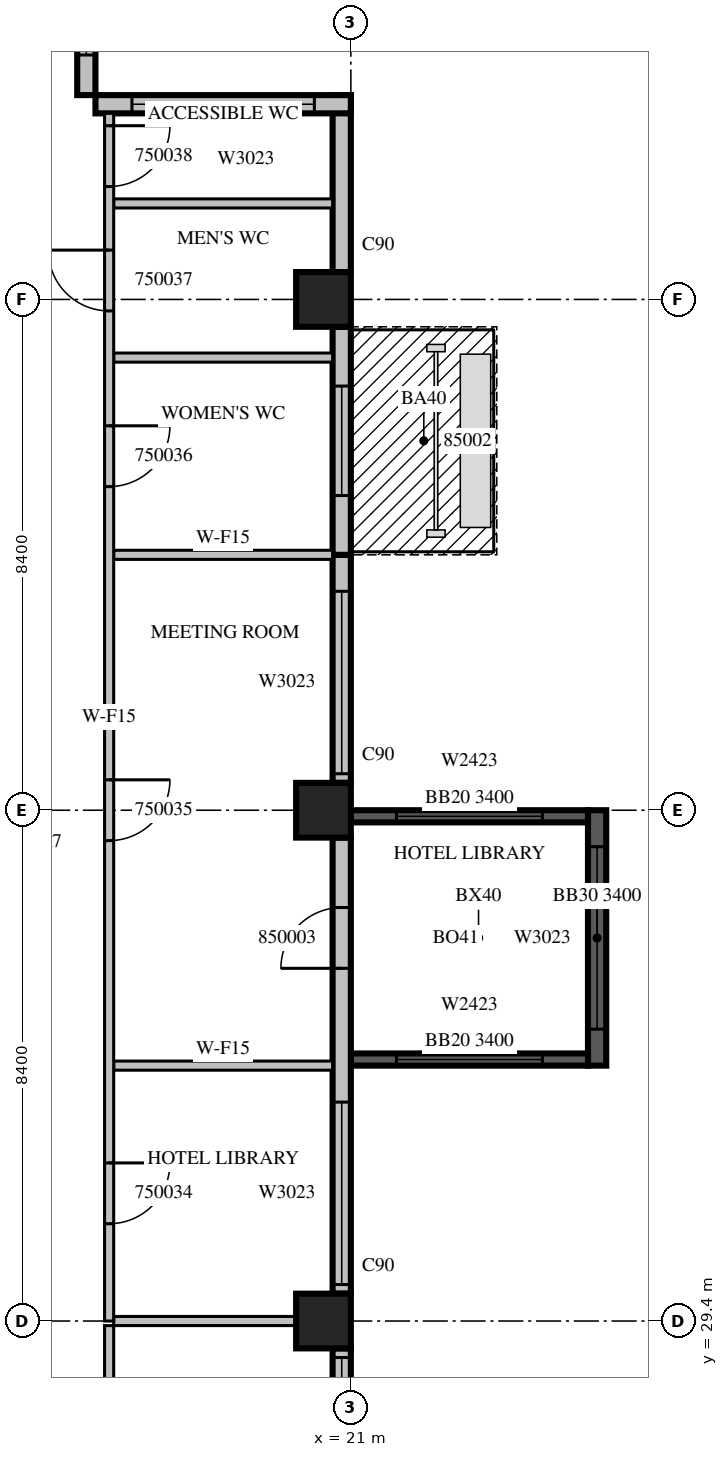
"""IFC4 building model, lengths in metres.
Left out: names, types, materials, properties, quantities, classifications, styles, units other than length and angle.
Written with IfcOpenShell. Run it as: python <this file> out.ifc"""

import sys

from ifc_helpers import new_model, si_unit, direction, frame, frame_2d, origin, origin_2d, place, context, subcontext, project, spatial, rectangle, extrude, source, transform, mapped, element, fill, save


model = new_model("IFC4")
c1 = context("Model", 3, precision=1e-05, world=origin(), true_north=direction((0.0, 1.0)))
c2 = subcontext(c1, "Body", "Model", "MODEL_VIEW")
j1 = project(units=[si_unit("LENGTHUNIT", "METRE"), si_unit("PLANEANGLEUNIT", "RADIAN")], contexts=[c1])
p1 = place(None, origin())
s1 = spatial("IfcSite", under=j1, at=p1, CompositionType="ELEMENT")
p2 = place(p1, origin())
s2 = spatial("IfcBuilding", under=s1, at=p2, CompositionType="ELEMENT")
p3 = place(p2, frame((0.0, 0.0, 223.4)))
s3 = spatial("IfcBuildingStorey", under=s2, at=p3, CompositionType="ELEMENT", Elevation=223.4)
m1 = source(origin(), c2, "Body", "SweptSolid", [
    extrude(rectangle(XDim=0.9, YDim=0.9, at=origin_2d()), origin(), (0.0, 0.0, 1.0), 3.8),
])
for number, where, z_axis, x_axis in (
    (1, (20.55, 29.4, 0.0), (0.0, 0.0, 1.0), (1.0, 0.0, 0.0)),
    (2, (20.55, 37.8, 0.0), (0.0, 0.0, 1.0), (1.0, 0.0, 0.0)),
    (3, (20.55, 46.2, 0.0), (0.0, 0.0, 1.0), (1.0, 0.0, 0.0)),
):
    element("IfcColumn", number, at=place(p3, frame(where, z_axis=z_axis, x_axis=x_axis)), inside=s3, PredefinedType="COLUMN", context=c2, shape_type="MappedRepresentation", body=[
        mapped(m1, transform((0.0, 0.0, 0.0), scale=1.0)),
    ])
m2 = source(origin(), c2, "Body", "SweptSolid", [
    extrude(rectangle(XDim=4.2, YDim=0.3, at=frame_2d((2.1, 0.0))), origin(), (0.0, 0.0, 1.0), 3.4),
])
p4 = place(p3, frame((25.05, 33.6, 0.0), z_axis=(0.0, 0.0, 1.0), x_axis=(0.0, 1.0, 0.0)))
e4 = element("IfcWall", 4, at=p4, inside=s3, PredefinedType="SOLIDWALL", context=c2, shape_type="MappedRepresentation", body=[
    mapped(m2, transform((0.0, 0.0, 0.0), scale=1.0)),
])
m3 = source(origin(), c2, "Body", "SweptSolid", [
    extrude(rectangle(XDim=3.0, YDim=2.3, at=frame_2d((1.5, 1.15))), frame((0.0, 0.16, 0.0), z_axis=(0.0, -1.0, 0.0), x_axis=(1.0, 0.0, 0.0)), (0.0, 0.0, 1.0), 0.32),
])
p5 = place(p4, frame((0.6, 0.0, 0.6)))
e5 = element("IfcOpeningElement", 5, at=p5, cuts=e4, PredefinedType="OPENING", context=c2, shape_type="MappedRepresentation", body=[
    mapped(m3, transform((0.0, 0.0, 0.0), scale=1.0)),
])
m4 = source(origin(), c2, "Body", "SweptSolid", [
    extrude(rectangle(XDim=3.9, YDim=0.2, at=frame_2d((1.95, 0.0))), origin(), (0.0, 0.0, 1.0), 3.4),
])
p6 = place(p3, frame((21.0, 33.7, 0.0), z_axis=(0.0, 0.0, 1.0), x_axis=(1.0, 0.0, 0.0)))
e6 = element("IfcWall", 6, at=p6, inside=s3, PredefinedType="SOLIDWALL", context=c2, shape_type="MappedRepresentation", body=[
    mapped(m4, transform((0.0, 0.0, 0.0), scale=1.0)),
])
m5 = source(origin(), c2, "Body", "SweptSolid", [
    extrude(rectangle(XDim=2.4, YDim=2.3, at=frame_2d((1.2, 1.15))), frame((0.0, 0.11, 0.0), z_axis=(0.0, -1.0, 0.0), x_axis=(1.0, 0.0, 0.0)), (0.0, 0.0, 1.0), 0.22),
])
p7 = place(p6, frame((0.75, 0.0, 0.6)))
e7 = element("IfcOpeningElement", 7, at=p7, cuts=e6, PredefinedType="OPENING", context=c2, shape_type="MappedRepresentation", body=[
    mapped(m5, transform((0.0, 0.0, 0.0), scale=1.0)),
])
p8 = place(p3, frame((21.0, 37.7, 0.0), z_axis=(0.0, 0.0, 1.0), x_axis=(1.0, 0.0, 0.0)))
e8 = element("IfcWall", 8, at=p8, inside=s3, PredefinedType="SOLIDWALL", context=c2, shape_type="MappedRepresentation", body=[
    mapped(m4, transform((0.0, 0.0, 0.0), scale=1.0)),
])
p9 = place(p8, frame((0.75, 0.0, 0.6)))
e9 = element("IfcOpeningElement", 9, at=p9, cuts=e8, PredefinedType="OPENING", context=c2, shape_type="MappedRepresentation", body=[
    mapped(m5, transform((0.0, 0.0, 0.0), scale=1.0)),
])
m6 = source(origin(), c2, "Body", "SweptSolid", [
    extrude(rectangle(XDim=7.15, YDim=0.3, at=frame_2d((3.575, 0.0))), origin(), (0.0, 0.0, 1.0), 3.4),
])
p10 = place(p3, frame((20.85, 21.8, 0.0), z_axis=(0.0, 0.0, 1.0), x_axis=(0.0, 1.0, 0.0)))
e10 = element("IfcWall", 10, at=p10, inside=s3, PredefinedType="STANDARD", context=c2, shape_type="MappedRepresentation", body=[
    mapped(m6, transform((0.0, 0.0, 0.0), scale=1.0)),
])
m7 = source(origin(), c2, "Body", "SweptSolid", [
    extrude(rectangle(XDim=1.8, YDim=2.3, at=frame_2d((0.9, 1.15))), frame((0.0, 0.16, 0.0), z_axis=(0.0, -1.0, 0.0), x_axis=(1.0, 0.0, 0.0)), (0.0, 0.0, 1.0), 0.32),
])
p11 = place(p10, frame((0.4, 0.0, 0.6)))
e11 = element("IfcOpeningElement", 11, at=p11, cuts=e10, PredefinedType="OPENING", context=c2, shape_type="MappedRepresentation", body=[
    mapped(m7, transform((0.0, 0.0, 0.0), scale=1.0)),
])
p12 = place(p10, frame((4.0, 0.0, 0.6)))
e12 = element("IfcOpeningElement", 12, at=p12, cuts=e10, PredefinedType="OPENING", context=c2, shape_type="MappedRepresentation", body=[
    mapped(m3, transform((0.0, 0.0, 0.0), scale=1.0)),
])
m8 = source(origin(), c2, "Body", "SweptSolid", [
    extrude(rectangle(XDim=7.5, YDim=0.3, at=frame_2d((3.75, 0.0))), origin(), (0.0, 0.0, 1.0), 3.4),
])
p13 = place(p3, frame((20.85, 29.85, 0.0), z_axis=(0.0, 0.0, 1.0), x_axis=(0.0, 1.0, 0.0)))
e13 = element("IfcWall", 13, at=p13, inside=s3, PredefinedType="STANDARD", context=c2, shape_type="MappedRepresentation", body=[
    mapped(m8, transform((0.0, 0.0, 0.0), scale=1.0)),
])
p14 = place(p13, frame((0.15, 0.0, 0.6)))
e14 = element("IfcOpeningElement", 14, at=p14, cuts=e13, PredefinedType="OPENING", context=c2, shape_type="MappedRepresentation", body=[
    mapped(m3, transform((0.0, 0.0, 0.0), scale=1.0)),
])
m9 = source(origin(), c2, "Body", "SweptSolid", [
    extrude(rectangle(XDim=1.0, YDim=2.1, at=frame_2d((0.5, 1.05))), frame((0.0, 0.16, 0.0), z_axis=(0.0, -1.0, 0.0), x_axis=(1.0, 0.0, 0.0)), (0.0, 0.0, 1.0), 0.32),
])
p15 = place(p13, frame((5.35, 0.0, 0.0)))
e15 = element("IfcOpeningElement", 15, at=p15, cuts=e13, PredefinedType="OPENING", context=c2, shape_type="MappedRepresentation", body=[
    mapped(m9, transform((0.0, 0.0, 0.0), scale=1.0)),
])
m10 = source(origin(), c2, "Body", "SweptSolid", [
    extrude(rectangle(XDim=3.75, YDim=0.3, at=frame_2d((1.875, 0.0))), origin(), (0.0, 0.0, 1.0), 3.4),
])
p16 = place(p3, frame((20.85, 38.25, 0.0), z_axis=(0.0, 0.0, 1.0), x_axis=(0.0, 1.0, 0.0)))
e16 = element("IfcWall", 16, at=p16, inside=s3, PredefinedType="STANDARD", context=c2, shape_type="MappedRepresentation", body=[
    mapped(m10, transform((0.0, 0.0, 0.0), scale=1.0)),
])
p17 = place(p16, frame((0.15, 0.0, 0.6)))
e17 = element("IfcOpeningElement", 17, at=p17, cuts=e16, PredefinedType="OPENING", context=c2, shape_type="MappedRepresentation", body=[
    mapped(m3, transform((0.0, 0.0, 0.0), scale=1.0)),
])
p18 = place(p3, frame((20.85, 42.0, 0.0), z_axis=(0.0, 0.0, 1.0), x_axis=(0.0, 1.0, 0.0)))
e18 = element("IfcWall", 18, at=p18, inside=s3, PredefinedType="STANDARD", context=c2, shape_type="MappedRepresentation", body=[
    mapped(m10, transform((0.0, 0.0, 0.0), scale=1.0)),
])
m11 = source(origin(), c2, "Body", "SweptSolid", [
    extrude(rectangle(XDim=1.8, YDim=2.4, at=frame_2d((0.9, 1.2))), frame((0.0, 0.16, 0.0), z_axis=(0.0, -1.0, 0.0), x_axis=(1.0, 0.0, 0.0)), (0.0, 0.0, 1.0), 0.32),
])
p19 = place(p18, frame((0.975, 0.0, 0.0)))
e19 = element("IfcOpeningElement", 19, at=p19, cuts=e18, PredefinedType="OPENING", context=c2, shape_type="MappedRepresentation", body=[
    mapped(m11, transform((0.0, 0.0, 0.0), scale=1.0)),
])
m12 = source(origin(), c2, "Body", "SweptSolid", [
    extrude(rectangle(XDim=2.91, YDim=0.3, at=frame_2d((1.455, 0.0))), origin(), (0.0, 0.0, 1.0), 3.4),
])
p20 = place(p3, frame((20.85, 46.65, 0.0), z_axis=(0.0, 0.0, 1.0), x_axis=(0.0, 1.0, 0.0)))
e20 = element("IfcWall", 20, at=p20, inside=s3, PredefinedType="STANDARD", context=c2, shape_type="MappedRepresentation", body=[
    mapped(m12, transform((0.0, 0.0, 0.0), scale=1.0)),
])
m13 = source(origin(), c2, "Body", "SweptSolid", [
    extrude(rectangle(XDim=4.2, YDim=0.3, at=frame_2d((2.1, 0.0))), origin(), (0.0, 0.0, 1.0), 3.4),
])
p21 = place(p3, frame((21.0, 49.41, 0.0), z_axis=(0.0, 0.0, 1.0), x_axis=(-1.0, 0.0, 0.0)))
e21 = element("IfcWall", 21, at=p21, inside=s3, PredefinedType="STANDARD", context=c2, shape_type="MappedRepresentation", body=[
    mapped(m13, transform((0.0, 0.0, 0.0), scale=1.0)),
])
p22 = place(p21, frame((0.6, 0.0, 0.6)))
e22 = element("IfcOpeningElement", 22, at=p22, cuts=e21, PredefinedType="OPENING", context=c2, shape_type="MappedRepresentation", body=[
    mapped(m3, transform((0.0, 0.0, 0.0), scale=1.0)),
])
m14 = source(origin(), c2, "Body", "SweptSolid", [
    extrude(rectangle(XDim=2.52, YDim=0.3, at=frame_2d((1.26, 0.0))), origin(), (0.0, 0.0, 1.0), 3.4),
])
p23 = place(p3, frame((16.65, 49.56, 0.0), z_axis=(0.0, 0.0, 1.0), x_axis=(0.0, 1.0, 0.0)))
e23 = element("IfcWall", 23, at=p23, inside=s3, PredefinedType="STANDARD", context=c2, shape_type="MappedRepresentation", body=[
    mapped(m14, transform((0.0, 0.0, 0.0), scale=1.0)),
])
m15 = source(origin(), c2, "Body", "SweptSolid", [
    extrude(rectangle(XDim=1.2, YDim=2.3, at=frame_2d((0.6, 1.15))), frame((0.0, 0.16, 0.0), z_axis=(0.0, -1.0, 0.0), x_axis=(1.0, 0.0, 0.0)), (0.0, 0.0, 1.0), 0.32),
])
p24 = place(p23, frame((0.66, 0.0, 0.6)))
e24 = element("IfcOpeningElement", 24, at=p24, cuts=e23, PredefinedType="OPENING", context=c2, shape_type="MappedRepresentation", body=[
    mapped(m15, transform((0.0, 0.0, 0.0), scale=1.0)),
])
m16 = source(origin(), c2, "Body", "SweptSolid", [
    extrude(rectangle(XDim=4.05, YDim=0.15, at=frame_2d((2.025, 0.0))), origin(), (0.0, 0.0, 1.0), 3.4),
])
p25 = place(p3, frame((17.025, 29.325, 0.0), z_axis=(0.0, 0.0, 1.0), x_axis=(0.0, -1.0, 0.0)))
e25 = element("IfcWall", 25, at=p25, inside=s3, PredefinedType="PARTITIONING", context=c2, shape_type="MappedRepresentation", body=[
    mapped(m16, transform((0.0, 0.0, 0.0), scale=1.0)),
])
m17 = source(origin(), c2, "Body", "SweptSolid", [
    extrude(rectangle(XDim=3.001, YDim=0.15, at=frame_2d((1.5, 0.0))), origin(), (0.0, 0.0, 1.0), 3.4),
])
p26 = place(p3, frame((20.101, 29.4, 0.0), z_axis=(0.0, 0.0, 1.0), x_axis=(-1.0, 0.0, 0.0)))
e26 = element("IfcWall", 26, at=p26, inside=s3, PredefinedType="PARTITIONING", context=c2, shape_type="MappedRepresentation", body=[
    mapped(m17, transform((0.0, 0.0, 0.0), scale=1.0)),
])
m18 = source(origin(), c2, "Body", "SweptSolid", [
    extrude(rectangle(XDim=3.6, YDim=0.15, at=frame_2d((1.8, 0.0))), origin(), (0.0, 0.0, 1.0), 3.4),
])
for number, where, z_axis, x_axis in (
    (27, (17.1, 45.244, 0.0), (0.0, 0.0, 1.0), (1.0, 0.0, 0.0)),
    (28, (17.1, 47.779, 0.0), (0.0, 0.0, 1.0), (1.0, 0.0, 0.0)),
    (29, (20.7, 33.6, 0.0), (0.0, 0.0, 1.0), (-1.0, 0.0, 0.0)),
    (30, (20.7, 42.0, 0.0), (0.0, 0.0, 1.0), (-1.0, 0.0, 0.0)),
):
    element("IfcWall", number, at=place(p3, frame(where, z_axis=z_axis, x_axis=x_axis)), inside=s3, PredefinedType="PARTITIONING", context=c2, shape_type="MappedRepresentation", body=[
        mapped(m18, transform((0.0, 0.0, 0.0), scale=1.0)),
    ])
m19 = source(origin(), c2, "Body", "SweptSolid", [
    extrude(rectangle(XDim=19.86, YDim=0.15, at=frame_2d((9.93, 0.0))), origin(), (0.0, 0.0, 1.0), 3.4),
])
p27 = place(p3, frame((17.025, 49.26, 0.0), z_axis=(0.0, 0.0, 1.0), x_axis=(0.0, -1.0, 0.0)))
e31 = element("IfcWall", 31, at=p27, inside=s3, PredefinedType="PARTITIONING", context=c2, shape_type="MappedRepresentation", body=[
    mapped(m19, transform((0.0, 0.0, 0.0), scale=1.0)),
])
m20 = source(origin(), c2, "Body", "SweptSolid", [
    extrude(rectangle(XDim=1.0, YDim=2.1, at=frame_2d((0.5, 1.05))), frame((0.0, 0.085, 0.0), z_axis=(0.0, -1.0, 0.0), x_axis=(1.0, 0.0, 0.0)), (0.0, 0.0, 1.0), 0.17),
])
p28 = place(p27, frame((17.26, 0.0, 0.0)))
e32 = element("IfcOpeningElement", 32, at=p28, cuts=e31, PredefinedType="OPENING", context=c2, shape_type="MappedRepresentation", body=[
    mapped(m20, transform((0.0, 0.0, 0.0), scale=1.0)),
])
p29 = place(p27, frame((10.96, 0.0, 0.0)))
e33 = element("IfcOpeningElement", 33, at=p29, cuts=e31, PredefinedType="OPENING", context=c2, shape_type="MappedRepresentation", body=[
    mapped(m20, transform((0.0, 0.0, 0.0), scale=1.0)),
])
p30 = place(p27, frame((5.138, 0.0, 0.0)))
e34 = element("IfcOpeningElement", 34, at=p30, cuts=e31, PredefinedType="OPENING", context=c2, shape_type="MappedRepresentation", body=[
    mapped(m20, transform((0.0, 0.0, 0.0), scale=1.0)),
])
p31 = place(p27, frame((2.249, 0.0, 0.0)))
e35 = element("IfcOpeningElement", 35, at=p31, cuts=e31, PredefinedType="OPENING", context=c2, shape_type="MappedRepresentation", body=[
    mapped(m20, transform((0.0, 0.0, 0.0), scale=1.0)),
])
p32 = place(p27, frame((0.203, 0.0, 0.0)))
e36 = element("IfcOpeningElement", 36, at=p32, cuts=e31, PredefinedType="OPENING", context=c2, shape_type="MappedRepresentation", body=[
    mapped(m20, transform((0.0, 0.0, 0.0), scale=1.0)),
])
m21 = source(origin(), c2, "Body", "SweptSolid", [
    extrude(rectangle(XDim=3.0, YDim=2.3, at=frame_2d((1.5, 1.15))), frame((0.0, 0.03, 0.0), z_axis=(0.0, -1.0, 0.0), x_axis=(1.0, 0.0, 0.0)), (0.0, 0.0, 1.0), 0.06),
])
p33 = place(p5, origin())
e37 = element("IfcWindow", 37, at=p33, inside=s3, PartitioningType="SINGLE_PANEL", PredefinedType="WINDOW", context=c2, shape_type="MappedRepresentation", body=[
    mapped(m21, transform((0.0, 0.0, 0.0), scale=1.0)),
])
fill(e5, e37)
m22 = source(origin(), c2, "Body", "SweptSolid", [
    extrude(rectangle(XDim=2.4, YDim=2.3, at=frame_2d((1.2, 1.15))), frame((0.0, 0.03, 0.0), z_axis=(0.0, -1.0, 0.0), x_axis=(1.0, 0.0, 0.0)), (0.0, 0.0, 1.0), 0.06),
])
p34 = place(p7, origin())
e38 = element("IfcWindow", 38, at=p34, inside=s3, PartitioningType="SINGLE_PANEL", PredefinedType="WINDOW", context=c2, shape_type="MappedRepresentation", body=[
    mapped(m22, transform((0.0, 0.0, 0.0), scale=1.0)),
])
fill(e7, e38)
p35 = place(p9, origin())
e39 = element("IfcWindow", 39, at=p35, inside=s3, PartitioningType="SINGLE_PANEL", PredefinedType="WINDOW", context=c2, shape_type="MappedRepresentation", body=[
    mapped(m22, transform((0.0, 0.0, 0.0), scale=1.0)),
])
fill(e9, e39)
p36 = place(p12, origin())
e40 = element("IfcWindow", 40, at=p36, inside=s3, PartitioningType="SINGLE_PANEL", PredefinedType="WINDOW", context=c2, shape_type="MappedRepresentation", body=[
    mapped(m21, transform((0.0, 0.0, 0.0), scale=1.0)),
])
fill(e12, e40)
p37 = place(p14, origin())
e41 = element("IfcWindow", 41, at=p37, inside=s3, PartitioningType="SINGLE_PANEL", PredefinedType="WINDOW", context=c2, shape_type="MappedRepresentation", body=[
    mapped(m21, transform((0.0, 0.0, 0.0), scale=1.0)),
])
fill(e14, e41)
p38 = place(p17, origin())
e42 = element("IfcWindow", 42, at=p38, inside=s3, PartitioningType="SINGLE_PANEL", PredefinedType="WINDOW", context=c2, shape_type="MappedRepresentation", body=[
    mapped(m21, transform((0.0, 0.0, 0.0), scale=1.0)),
])
fill(e17, e42)
m23 = source(origin(), c2, "Body", "SweptSolid", [
    extrude(rectangle(XDim=1.8, YDim=2.4, at=frame_2d((0.9, 1.2))), frame((0.0, 0.025, 0.0), z_axis=(0.0, -1.0, 0.0), x_axis=(1.0, 0.0, 0.0)), (0.0, 0.0, 1.0), 0.05),
])
p39 = place(p19, origin())
e43 = element("IfcDoor", 43, at=p39, inside=s3, OperationType="SLIDING_TO_LEFT", PredefinedType="DOOR", context=c2, shape_type="MappedRepresentation", body=[
    mapped(m23, transform((0.0, 0.0, 0.0), scale=1.0)),
])
fill(e19, e43)
p40 = place(p22, origin())
e44 = element("IfcWindow", 44, at=p40, inside=s3, PartitioningType="SINGLE_PANEL", PredefinedType="WINDOW", context=c2, shape_type="MappedRepresentation", body=[
    mapped(m21, transform((0.0, 0.0, 0.0), scale=1.0)),
])
fill(e22, e44)
m24 = source(origin(), c2, "Body", "SweptSolid", [
    extrude(rectangle(XDim=1.2, YDim=2.3, at=frame_2d((0.6, 1.15))), frame((0.0, 0.03, 0.0), z_axis=(0.0, -1.0, 0.0), x_axis=(1.0, 0.0, 0.0)), (0.0, 0.0, 1.0), 0.06),
])
p41 = place(p24, origin())
e45 = element("IfcWindow", 45, at=p41, inside=s3, PartitioningType="SINGLE_PANEL", PredefinedType="WINDOW", context=c2, shape_type="MappedRepresentation", body=[
    mapped(m24, transform((0.0, 0.0, 0.0), scale=1.0)),
])
fill(e24, e45)
m25 = source(origin(), c2, "Body", "SweptSolid", [
    extrude(rectangle(XDim=1.0, YDim=2.1, at=frame_2d((0.5, 1.05))), frame((0.0, 0.025, 0.0), z_axis=(0.0, -1.0, 0.0), x_axis=(1.0, 0.0, 0.0)), (0.0, 0.0, 1.0), 0.05),
])
p42 = place(p28, origin())
e46 = element("IfcDoor", 46, at=p42, inside=s3, OperationType="SINGLE_SWING_LEFT", PredefinedType="DOOR", context=c2, shape_type="MappedRepresentation", body=[
    mapped(m25, transform((0.0, 0.0, 0.0), scale=1.0)),
])
fill(e32, e46)
p43 = place(p29, origin())
e47 = element("IfcDoor", 47, at=p43, inside=s3, OperationType="SINGLE_SWING_LEFT", PredefinedType="DOOR", context=c2, shape_type="MappedRepresentation", body=[
    mapped(m25, transform((0.0, 0.0, 0.0), scale=1.0)),
])
fill(e33, e47)
p44 = place(p30, origin())
e48 = element("IfcDoor", 48, at=p44, inside=s3, OperationType="SINGLE_SWING_LEFT", PredefinedType="DOOR", context=c2, shape_type="MappedRepresentation", body=[
    mapped(m25, transform((0.0, 0.0, 0.0), scale=1.0)),
])
fill(e34, e48)
p45 = place(p31, origin())
e49 = element("IfcDoor", 49, at=p45, inside=s3, OperationType="SINGLE_SWING_RIGHT", PredefinedType="DOOR", context=c2, shape_type="MappedRepresentation", body=[
    mapped(m25, transform((0.0, 0.0, 0.0), scale=1.0)),
])
fill(e35, e49)
p46 = place(p32, origin())
e50 = element("IfcDoor", 50, at=p46, inside=s3, OperationType="SINGLE_SWING_LEFT", PredefinedType="DOOR", context=c2, shape_type="MappedRepresentation", body=[
    mapped(m25, transform((0.0, 0.0, 0.0), scale=1.0)),
])
fill(e36, e50)
p47 = place(p15, origin())
e51 = element("IfcDoor", 51, at=p47, inside=s3, OperationType="SINGLE_SWING_LEFT", PredefinedType="DOOR", context=c2, shape_type="MappedRepresentation", body=[
    mapped(m25, transform((0.0, 0.0, 0.0), scale=1.0)),
])
fill(e15, e51)
save(model, sys.argv[1])
